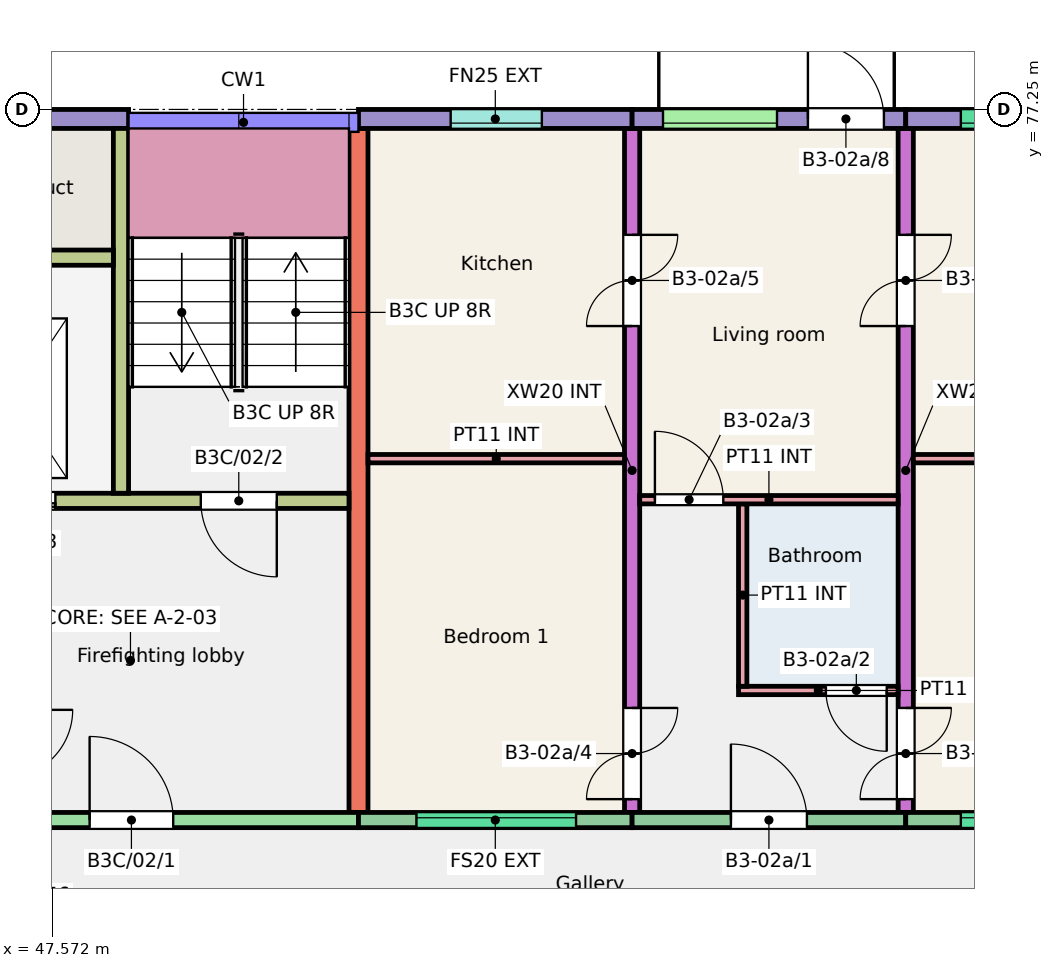
"""IFC4 building model, lengths in metres.
Left out: names, types, materials, properties, quantities, classifications, styles, units other than length and angle.
Written with IfcOpenShell. Run it as: python <this file> out.ifc"""

import sys

from ifc_helpers import new_model, si_unit, direction, frame, frame_2d, origin, place, context, subcontext, project, spatial, rectangle, extrude, element, fill, save


model = new_model("IFC4")
c1 = context("Model", 3, precision=1e-05, world=origin(), true_north=direction((0.0, 1.0)))
c2 = subcontext(c1, "Body", "Model", "MODEL_VIEW")
j1 = project(units=[si_unit("LENGTHUNIT", "METRE"), si_unit("PLANEANGLEUNIT", "RADIAN")], contexts=[c1])
p1 = place(None, origin())
s1 = spatial("IfcSite", under=j1, at=p1, CompositionType="ELEMENT")
p2 = place(p1, origin())
s2 = spatial("IfcBuilding", under=s1, at=p2, CompositionType="ELEMENT")
p3 = place(p2, frame((0.0, 0.0, 6.0)))
s3 = spatial("IfcBuildingStorey", under=s2, at=p3, CompositionType="ELEMENT", Elevation=6.0)
p4 = place(p3, frame((51.6, 68.0, 0.0), z_axis=(0.0, 0.0, 1.0), x_axis=(0.0, 1.0, 0.0)))
e1 = element("IfcWall", 1, at=p4, inside=s3, PredefinedType="SHEAR", context=c2, shape_type="SweptSolid", body=[
    extrude(rectangle(XDim=9.0, YDim=0.25, at=frame_2d((4.5, 0.0))), origin(), (0.0, 0.0, 1.0), 3.0),
])
p5 = place(p3, frame((55.2, 68.0, 0.0), z_axis=(0.0, 0.0, 1.0), x_axis=(0.0, 1.0, 0.0)))
e2 = element("IfcWall", 2, at=p5, inside=s3, PredefinedType="SHEAR", context=c2, shape_type="SweptSolid", body=[
    extrude(rectangle(XDim=9.0, YDim=0.2, at=frame_2d((4.5, 0.0))), origin(), (0.0, 0.0, 1.0), 3.0),
])
p6 = place(p5, frame((0.175, 0.0, 0.0)))
e3 = element("IfcOpeningElement", 3, at=p6, cuts=e2, PredefinedType="OPENING", context=c2, shape_type="SweptSolid", body=[
    extrude(rectangle(XDim=1.2, YDim=2.1, at=frame_2d((0.6, 1.05))), frame((0.0, 0.11, 0.0), z_axis=(0.0, -1.0, 0.0), x_axis=(1.0, 0.0, 0.0)), (0.0, 0.0, 1.0), 0.22),
])
p7 = place(p5, frame((6.4, 0.0, 0.0)))
e4 = element("IfcOpeningElement", 4, at=p7, cuts=e2, PredefinedType="OPENING", context=c2, shape_type="SweptSolid", body=[
    extrude(rectangle(XDim=1.2, YDim=2.1, at=frame_2d((0.6, 1.05))), frame((0.0, 0.11, 0.0), z_axis=(0.0, -1.0, 0.0), x_axis=(1.0, 0.0, 0.0)), (0.0, 0.0, 1.0), 0.22),
])
p8 = place(p3, frame((58.8, 68.0, 0.0), z_axis=(0.0, 0.0, 1.0), x_axis=(0.0, 1.0, 0.0)))
e5 = element("IfcWall", 5, at=p8, inside=s3, PredefinedType="SHEAR", context=c2, shape_type="SweptSolid", body=[
    extrude(rectangle(XDim=9.0, YDim=0.2, at=frame_2d((4.5, 0.0))), origin(), (0.0, 0.0, 1.0), 3.0),
])
p9 = place(p8, frame((0.175, 0.0, 0.0)))
e6 = element("IfcOpeningElement", 6, at=p9, cuts=e5, PredefinedType="OPENING", context=c2, shape_type="SweptSolid", body=[
    extrude(rectangle(XDim=1.2, YDim=2.1, at=frame_2d((0.6, 1.05))), frame((0.0, 0.11, 0.0), z_axis=(0.0, -1.0, 0.0), x_axis=(1.0, 0.0, 0.0)), (0.0, 0.0, 1.0), 0.22),
])
p10 = place(p8, frame((6.4, 0.0, 0.0)))
e7 = element("IfcOpeningElement", 7, at=p10, cuts=e5, PredefinedType="OPENING", context=c2, shape_type="SweptSolid", body=[
    extrude(rectangle(XDim=1.2, YDim=2.1, at=frame_2d((0.6, 1.05))), frame((0.0, 0.11, 0.0), z_axis=(0.0, -1.0, 0.0), x_axis=(1.0, 0.0, 0.0)), (0.0, 0.0, 1.0), 0.22),
])
p11 = place(p3, frame((45.6, 77.125, 0.0), z_axis=(0.0, 0.0, 1.0), x_axis=(1.0, 0.0, 0.0)))
e8 = element("IfcWall", 8, at=p11, inside=s3, PredefinedType="SOLIDWALL", context=c2, shape_type="SweptSolid", body=[
    extrude(rectangle(XDim=2.975, YDim=0.25, at=frame_2d((1.487, 0.0))), origin(), (0.0, 0.0, 1.0), 3.0),
])
p12 = place(p3, frame((45.75, 67.9, 0.0), z_axis=(0.0, 0.0, 1.0), x_axis=(1.0, 0.0, 0.0)))
e9 = element("IfcWall", 9, at=p12, inside=s3, PredefinedType="SHEAR", context=c2, shape_type="SweptSolid", body=[
    extrude(rectangle(XDim=5.85, YDim=0.2, at=frame_2d((2.925, 0.0))), origin(), (0.0, 0.0, 1.0), 3.0),
])
p13 = place(p12, frame((2.312, 0.0, 0.0)))
e10 = element("IfcOpeningElement", 10, at=p13, cuts=e9, PredefinedType="OPENING", context=c2, shape_type="SweptSolid", body=[
    extrude(rectangle(XDim=1.1, YDim=2.1, at=frame_2d((0.55, 1.05))), frame((0.0, 0.11, 0.0), z_axis=(0.0, -1.0, 0.0), x_axis=(1.0, 0.0, 0.0)), (0.0, 0.0, 1.0), 0.22),
])
p14 = place(p3, frame((45.75, 72.1, 0.0), z_axis=(0.0, 0.0, 1.0), x_axis=(1.0, 0.0, 0.0)))
e11 = element("IfcWall", 11, at=p14, inside=s3, PredefinedType="SHEAR", context=c2, shape_type="SweptSolid", body=[
    extrude(rectangle(XDim=5.725, YDim=0.2, at=frame_2d((2.863, 0.0))), origin(), (0.0, 0.0, 1.0), 3.0),
])
p15 = place(p14, frame((3.775, 0.0, 0.0)))
e12 = element("IfcOpeningElement", 12, at=p15, cuts=e11, PredefinedType="OPENING", context=c2, shape_type="SweptSolid", body=[
    extrude(rectangle(XDim=1.0, YDim=2.1, at=frame_2d((0.5, 1.05))), frame((0.0, 0.11, 0.0), z_axis=(0.0, -1.0, 0.0), x_axis=(1.0, 0.0, 0.0)), (0.0, 0.0, 1.0), 0.22),
])
p16 = place(p14, frame((0.762, 0.0, 0.0)))
e13 = element("IfcOpeningElement", 13, at=p16, cuts=e11, PredefinedType="OPENING", context=c2, shape_type="SweptSolid", body=[
    extrude(rectangle(XDim=1.1, YDim=2.1, at=frame_2d((0.55, 1.05))), frame((0.0, 0.11, 0.0), z_axis=(0.0, -1.0, 0.0), x_axis=(1.0, 0.0, 0.0)), (0.0, 0.0, 1.0), 0.22),
])
p17 = place(p3, frame((48.475, 72.2, 0.0), z_axis=(0.0, 0.0, 1.0), x_axis=(0.0, 1.0, 0.0)))
e14 = element("IfcWall", 14, at=p17, inside=s3, PredefinedType="SHEAR", context=c2, shape_type="SweptSolid", body=[
    extrude(rectangle(XDim=4.8, YDim=0.2, at=frame_2d((2.4, 0.0))), origin(), (0.0, 0.0, 1.0), 3.0),
])
p18 = place(p3, frame((45.75, 75.3, 0.0), z_axis=(0.0, 0.0, 1.0), x_axis=(1.0, 0.0, 0.0)))
e15 = element("IfcWall", 15, at=p18, inside=s3, PredefinedType="SHEAR", context=c2, shape_type="SweptSolid", body=[
    extrude(rectangle(XDim=2.625, YDim=0.2, at=frame_2d((1.312, 0.0))), origin(), (0.0, 0.0, 1.0), 3.0),
])
p19 = place(p3, frame((51.6, 77.125, 0.0), z_axis=(0.0, 0.0, 1.0), x_axis=(1.0, 0.0, 0.0)))
e16 = element("IfcWall", 16, at=p19, inside=s3, PredefinedType="SOLIDWALL", context=c2, shape_type="SweptSolid", body=[
    extrude(rectangle(XDim=3.6, YDim=0.25, at=frame_2d((1.8, 0.0))), origin(), (0.0, 0.0, 1.0), 3.0),
])
p20 = place(p19, frame((1.212, 0.0, 1.1)))
e17 = element("IfcOpeningElement", 17, at=p20, cuts=e16, PredefinedType="OPENING", context=c2, shape_type="SweptSolid", body=[
    extrude(rectangle(XDim=1.2, YDim=1.3, at=frame_2d((0.6, 0.65))), frame((0.0, 0.135, 0.0), z_axis=(0.0, -1.0, 0.0), x_axis=(1.0, 0.0, 0.0)), (0.0, 0.0, 1.0), 0.27),
])
p21 = place(p3, frame((51.6, 67.9, 0.0), z_axis=(0.0, 0.0, 1.0), x_axis=(1.0, 0.0, 0.0)))
e18 = element("IfcWall", 18, at=p21, inside=s3, PredefinedType="SOLIDWALL", context=c2, shape_type="SweptSolid", body=[
    extrude(rectangle(XDim=3.6, YDim=0.2, at=frame_2d((1.8, 0.0))), origin(), (0.0, 0.0, 1.0), 3.0),
])
p22 = place(p21, frame((0.762, 0.0, 1.2)))
e19 = element("IfcOpeningElement", 19, at=p22, cuts=e18, PredefinedType="OPENING", context=c2, shape_type="SweptSolid", body=[
    extrude(rectangle(XDim=2.1, YDim=1.2, at=frame_2d((1.05, 0.6))), frame((0.0, 0.11, 0.0), z_axis=(0.0, -1.0, 0.0), x_axis=(1.0, 0.0, 0.0)), (0.0, 0.0, 1.0), 0.22),
])
p23 = place(p3, frame((55.2, 77.125, 0.0), z_axis=(0.0, 0.0, 1.0), x_axis=(1.0, 0.0, 0.0)))
e20 = element("IfcWall", 20, at=p23, inside=s3, PredefinedType="SOLIDWALL", context=c2, shape_type="SweptSolid", body=[
    extrude(rectangle(XDim=3.6, YDim=0.25, at=frame_2d((1.8, 0.0))), origin(), (0.0, 0.0, 1.0), 3.0),
])
p24 = place(p23, frame((0.406, 0.0, 1.2)))
e21 = element("IfcOpeningElement", 21, at=p24, cuts=e20, PredefinedType="OPENING", context=c2, shape_type="SweptSolid", body=[
    extrude(rectangle(XDim=1.5, YDim=1.2, at=frame_2d((0.75, 0.6))), frame((0.0, 0.135, 0.0), z_axis=(0.0, -1.0, 0.0), x_axis=(1.0, 0.0, 0.0)), (0.0, 0.0, 1.0), 0.27),
])
p25 = place(p23, frame((2.313, 0.0, 0.0)))
e22 = element("IfcOpeningElement", 22, at=p25, cuts=e20, PredefinedType="OPENING", context=c2, shape_type="SweptSolid", body=[
    extrude(rectangle(XDim=1.0, YDim=2.1, at=frame_2d((0.5, 1.05))), frame((0.0, 0.135, 0.0), z_axis=(0.0, -1.0, 0.0), x_axis=(1.0, 0.0, 0.0)), (0.0, 0.0, 1.0), 0.27),
])
p26 = place(p3, frame((55.2, 67.9, 0.0), z_axis=(0.0, 0.0, 1.0), x_axis=(1.0, 0.0, 0.0)))
e23 = element("IfcWall", 23, at=p26, inside=s3, PredefinedType="SOLIDWALL", context=c2, shape_type="SweptSolid", body=[
    extrude(rectangle(XDim=3.6, YDim=0.2, at=frame_2d((1.8, 0.0))), origin(), (0.0, 0.0, 1.0), 3.0),
])
p27 = place(p26, frame((1.3, 0.0, 0.0)))
e24 = element("IfcOpeningElement", 24, at=p27, cuts=e23, PredefinedType="OPENING", context=c2, shape_type="SweptSolid", body=[
    extrude(rectangle(XDim=1.0, YDim=2.1, at=frame_2d((0.5, 1.05))), frame((0.0, 0.11, 0.0), z_axis=(0.0, -1.0, 0.0), x_axis=(1.0, 0.0, 0.0)), (0.0, 0.0, 1.0), 0.22),
])
p28 = place(p3, frame((58.8, 77.125, 0.0), z_axis=(0.0, 0.0, 1.0), x_axis=(1.0, 0.0, 0.0)))
e25 = element("IfcWall", 25, at=p28, inside=s3, PredefinedType="SOLIDWALL", context=c2, shape_type="SweptSolid", body=[
    extrude(rectangle(XDim=3.6, YDim=0.25, at=frame_2d((1.8, 0.0))), origin(), (0.0, 0.0, 1.0), 3.0),
])
p29 = place(p28, frame((0.725, 0.0, 1.2)))
e26 = element("IfcOpeningElement", 26, at=p29, cuts=e25, PredefinedType="OPENING", context=c2, shape_type="SweptSolid", body=[
    extrude(rectangle(XDim=2.1, YDim=1.2, at=frame_2d((1.05, 0.6))), frame((0.0, 0.135, 0.0), z_axis=(0.0, -1.0, 0.0), x_axis=(1.0, 0.0, 0.0)), (0.0, 0.0, 1.0), 0.27),
])
p30 = place(p3, frame((58.8, 67.9, 0.0), z_axis=(0.0, 0.0, 1.0), x_axis=(1.0, 0.0, 0.0)))
e27 = element("IfcWall", 27, at=p30, inside=s3, PredefinedType="SOLIDWALL", context=c2, shape_type="SweptSolid", body=[
    extrude(rectangle(XDim=3.45, YDim=0.2, at=frame_2d((1.725, 0.0))), origin(), (0.0, 0.0, 1.0), 3.0),
])
p31 = place(p30, frame((0.725, 0.0, 1.2)))
e28 = element("IfcOpeningElement", 28, at=p31, cuts=e27, PredefinedType="OPENING", context=c2, shape_type="SweptSolid", body=[
    extrude(rectangle(XDim=2.1, YDim=1.2, at=frame_2d((1.05, 0.6))), frame((0.0, 0.11, 0.0), z_axis=(0.0, -1.0, 0.0), x_axis=(1.0, 0.0, 0.0)), (0.0, 0.0, 1.0), 0.22),
])
p32 = place(p3, frame((56.6, 69.605, 0.0), z_axis=(0.0, 0.0, 1.0), x_axis=(1.0, 0.0, 0.0)))
e29 = element("IfcWall", 29, at=p32, inside=s3, PredefinedType="PARTITIONING", context=c2, shape_type="SweptSolid", body=[
    extrude(rectangle(XDim=2.1, YDim=0.11, at=frame_2d((1.05, 0.0))), origin(), (0.0, 0.0, 1.0), 2.8),
])
p33 = place(p32, frame((1.15, 0.0, 0.0)))
e30 = element("IfcOpeningElement", 30, at=p33, cuts=e29, PredefinedType="OPENING", context=c2, shape_type="SweptSolid", body=[
    extrude(rectangle(XDim=0.8, YDim=2.1, at=frame_2d((0.4, 1.05))), frame((0.0, 0.065, 0.0), z_axis=(0.0, -1.0, 0.0), x_axis=(1.0, 0.0, 0.0)), (0.0, 0.0, 1.0), 0.13),
])
p34 = place(p3, frame((56.655, 69.66, 0.0), z_axis=(0.0, 0.0, 1.0), x_axis=(0.0, 1.0, 0.0)))
e31 = element("IfcWall", 31, at=p34, inside=s3, PredefinedType="PARTITIONING", context=c2, shape_type="SweptSolid", body=[
    extrude(rectangle(XDim=2.4, YDim=0.11, at=frame_2d((1.2, 0.0))), origin(), (0.0, 0.0, 1.0), 2.8),
])
p35 = place(p3, frame((55.3, 72.115, 0.0), z_axis=(0.0, 0.0, 1.0), x_axis=(1.0, 0.0, 0.0)))
e32 = element("IfcWall", 32, at=p35, inside=s3, PredefinedType="PARTITIONING", context=c2, shape_type="SweptSolid", body=[
    extrude(rectangle(XDim=3.4, YDim=0.11, at=frame_2d((1.7, 0.0))), origin(), (0.0, 0.0, 1.0), 2.8),
])
p36 = place(p35, frame((0.2, 0.0, 0.0)))
e33 = element("IfcOpeningElement", 33, at=p36, cuts=e32, PredefinedType="OPENING", context=c2, shape_type="SweptSolid", body=[
    extrude(rectangle(XDim=0.9, YDim=2.1, at=frame_2d((0.45, 1.05))), frame((0.0, 0.065, 0.0), z_axis=(0.0, -1.0, 0.0), x_axis=(1.0, 0.0, 0.0)), (0.0, 0.0, 1.0), 0.13),
])
p37 = place(p3, frame((51.725, 72.655, 0.0), z_axis=(0.0, 0.0, 1.0), x_axis=(1.0, 0.0, 0.0)))
e34 = element("IfcWall", 34, at=p37, inside=s3, PredefinedType="PARTITIONING", context=c2, shape_type="SweptSolid", body=[
    extrude(rectangle(XDim=3.375, YDim=0.11, at=frame_2d((1.688, 0.0))), origin(), (0.0, 0.0, 1.0), 2.8),
])
p38 = place(p3, frame((58.9, 72.655, 0.0), z_axis=(0.0, 0.0, 1.0), x_axis=(1.0, 0.0, 0.0)))
e35 = element("IfcWall", 35, at=p38, inside=s3, PredefinedType="PARTITIONING", context=c2, shape_type="SweptSolid", body=[
    extrude(rectangle(XDim=3.35, YDim=0.11, at=frame_2d((1.675, 0.0))), origin(), (0.0, 0.0, 1.0), 2.8),
])
p39 = place(p22, origin())
e36 = element("IfcWindow", 36, at=p39, inside=s3, PartitioningType="SINGLE_PANEL", PredefinedType="WINDOW", context=c2, shape_type="SweptSolid", body=[
    extrude(rectangle(XDim=2.1, YDim=1.2, at=frame_2d((1.05, 0.6))), frame((0.0, 0.06, 0.0), z_axis=(0.0, -1.0, 0.0), x_axis=(1.0, 0.0, 0.0)), (0.0, 0.0, 1.0), 0.06),
])
fill(e19, e36)
p40 = place(p20, origin())
e37 = element("IfcWindow", 37, at=p40, inside=s3, PartitioningType="SINGLE_PANEL", PredefinedType="WINDOW", context=c2, shape_type="SweptSolid", body=[
    extrude(rectangle(XDim=1.2, YDim=1.3, at=frame_2d((0.6, 0.65))), frame((0.0, -0.025, 0.0), z_axis=(0.0, -1.0, 0.0), x_axis=(1.0, 0.0, 0.0)), (0.0, 0.0, 1.0), 0.06),
])
fill(e17, e37)
p41 = place(p31, origin())
e38 = element("IfcWindow", 38, at=p41, inside=s3, PartitioningType="SINGLE_PANEL", PredefinedType="WINDOW", context=c2, shape_type="SweptSolid", body=[
    extrude(rectangle(XDim=2.1, YDim=1.2, at=frame_2d((1.05, 0.6))), frame((0.0, 0.06, 0.0), z_axis=(0.0, -1.0, 0.0), x_axis=(1.0, 0.0, 0.0)), (0.0, 0.0, 1.0), 0.06),
])
fill(e28, e38)
p42 = place(p29, origin())
e39 = element("IfcWindow", 39, at=p42, inside=s3, PartitioningType="SINGLE_PANEL", PredefinedType="WINDOW", context=c2, shape_type="SweptSolid", body=[
    extrude(rectangle(XDim=2.1, YDim=1.2, at=frame_2d((1.05, 0.6))), frame((0.0, -0.025, 0.0), z_axis=(0.0, -1.0, 0.0), x_axis=(1.0, 0.0, 0.0)), (0.0, 0.0, 1.0), 0.06),
])
fill(e26, e39)
p43 = place(p24, origin())
e40 = element("IfcWindow", 40, at=p43, inside=s3, PartitioningType="SINGLE_PANEL", PredefinedType="WINDOW", context=c2, shape_type="SweptSolid", body=[
    extrude(rectangle(XDim=1.5, YDim=1.2, at=frame_2d((0.75, 0.6))), frame((0.0, -0.025, 0.0), z_axis=(0.0, -1.0, 0.0), x_axis=(1.0, 0.0, 0.0)), (0.0, 0.0, 1.0), 0.06),
])
fill(e21, e40)
p44 = place(p27, origin())
e41 = element("IfcDoor", 41, at=p44, inside=s3, OperationType="SINGLE_SWING_LEFT", PredefinedType="DOOR", context=c2, shape_type="SweptSolid", body=[
    extrude(rectangle(XDim=1.0, YDim=2.1, at=frame_2d((0.5, 1.05))), frame((0.0, 0.025, 0.0), z_axis=(0.0, -1.0, 0.0), x_axis=(1.0, 0.0, 0.0)), (0.0, 0.0, 1.0), 0.05),
])
fill(e24, e41)
p45 = place(p33, origin())
e42 = element("IfcDoor", 42, at=p45, inside=s3, OperationType="SINGLE_SWING_RIGHT", PredefinedType="DOOR", context=c2, shape_type="SweptSolid", body=[
    extrude(rectangle(XDim=0.8, YDim=2.1, at=frame_2d((0.4, 1.05))), frame((0.0, 0.025, 0.0), z_axis=(0.0, -1.0, 0.0), x_axis=(1.0, 0.0, 0.0)), (0.0, 0.0, 1.0), 0.05),
])
fill(e30, e42)
p46 = place(p36, origin())
e43 = element("IfcDoor", 43, at=p46, inside=s3, OperationType="SINGLE_SWING_LEFT", PredefinedType="DOOR", context=c2, shape_type="SweptSolid", body=[
    extrude(rectangle(XDim=0.9, YDim=2.1, at=frame_2d((0.45, 1.05))), frame((0.0, 0.025, 0.0), z_axis=(0.0, -1.0, 0.0), x_axis=(1.0, 0.0, 0.0)), (0.0, 0.0, 1.0), 0.05),
])
fill(e33, e43)
p47 = place(p6, origin())
e44 = element("IfcDoor", 44, at=p47, inside=s3, OperationType="DOUBLE_DOOR_SINGLE_SWING", PredefinedType="DOOR", context=c2, shape_type="SweptSolid", body=[
    extrude(rectangle(XDim=1.2, YDim=2.1, at=frame_2d((0.6, 1.05))), frame((0.0, 0.025, 0.0), z_axis=(0.0, -1.0, 0.0), x_axis=(1.0, 0.0, 0.0)), (0.0, 0.0, 1.0), 0.05),
])
fill(e3, e44)
p48 = place(p7, origin())
e45 = element("IfcDoor", 45, at=p48, inside=s3, OperationType="DOUBLE_DOOR_SINGLE_SWING", PredefinedType="DOOR", context=c2, shape_type="SweptSolid", body=[
    extrude(rectangle(XDim=1.2, YDim=2.1, at=frame_2d((0.6, 1.05))), frame((0.0, 0.025, 0.0), z_axis=(0.0, -1.0, 0.0), x_axis=(1.0, 0.0, 0.0)), (0.0, 0.0, 1.0), 0.05),
])
fill(e4, e45)
p49 = place(p9, origin())
e46 = element("IfcDoor", 46, at=p49, inside=s3, OperationType="DOUBLE_DOOR_SINGLE_SWING", PredefinedType="DOOR", context=c2, shape_type="SweptSolid", body=[
    extrude(rectangle(XDim=1.2, YDim=2.1, at=frame_2d((0.6, 1.05))), frame((0.0, 0.025, 0.0), z_axis=(0.0, -1.0, 0.0), x_axis=(1.0, 0.0, 0.0)), (0.0, 0.0, 1.0), 0.05),
])
fill(e6, e46)
p50 = place(p10, origin())
e47 = element("IfcDoor", 47, at=p50, inside=s3, OperationType="DOUBLE_DOOR_SINGLE_SWING", PredefinedType="DOOR", context=c2, shape_type="SweptSolid", body=[
    extrude(rectangle(XDim=1.2, YDim=2.1, at=frame_2d((0.6, 1.05))), frame((0.0, 0.025, 0.0), z_axis=(0.0, -1.0, 0.0), x_axis=(1.0, 0.0, 0.0)), (0.0, 0.0, 1.0), 0.05),
])
fill(e7, e47)
p51 = place(p25, origin())
e48 = element("IfcDoor", 48, at=p51, inside=s3, OperationType="SINGLE_SWING_LEFT", PredefinedType="DOOR", context=c2, shape_type="SweptSolid", body=[
    extrude(rectangle(XDim=1.0, YDim=2.1, at=frame_2d((0.5, 1.05))), frame((0.0, 0.025, 0.0), z_axis=(0.0, -1.0, 0.0), x_axis=(1.0, 0.0, 0.0)), (0.0, 0.0, 1.0), 0.05),
])
fill(e22, e48)
p52 = place(p13, origin())
e49 = element("IfcDoor", 49, at=p52, inside=s3, OperationType="SINGLE_SWING_LEFT", PredefinedType="DOOR", context=c2, shape_type="SweptSolid", body=[
    extrude(rectangle(XDim=1.1, YDim=2.1, at=frame_2d((0.55, 1.05))), frame((0.0, 0.025, 0.0), z_axis=(0.0, -1.0, 0.0), x_axis=(1.0, 0.0, 0.0)), (0.0, 0.0, 1.0), 0.05),
])
fill(e10, e49)
p53 = place(p15, origin())
e50 = element("IfcDoor", 50, at=p53, inside=s3, OperationType="SINGLE_SWING_RIGHT", PredefinedType="DOOR", context=c2, shape_type="SweptSolid", body=[
    extrude(rectangle(XDim=1.0, YDim=2.1, at=frame_2d((0.5, 1.05))), frame((0.0, 0.025, 0.0), z_axis=(0.0, -1.0, 0.0), x_axis=(1.0, 0.0, 0.0)), (0.0, 0.0, 1.0), 0.05),
])
fill(e12, e50)
p54 = place(p16, origin())
e51 = element("IfcDoor", 51, at=p54, inside=s3, OperationType="DOUBLE_DOOR_SLIDING", PredefinedType="DOOR", context=c2, shape_type="SweptSolid", body=[
    extrude(rectangle(XDim=1.1, YDim=2.1, at=frame_2d((0.55, 1.05))), frame((0.0, 0.025, 0.0), z_axis=(0.0, -1.0, 0.0), x_axis=(1.0, 0.0, 0.0)), (0.0, 0.0, 1.0), 0.05),
])
fill(e13, e51)
save(model, sys.argv[1])
